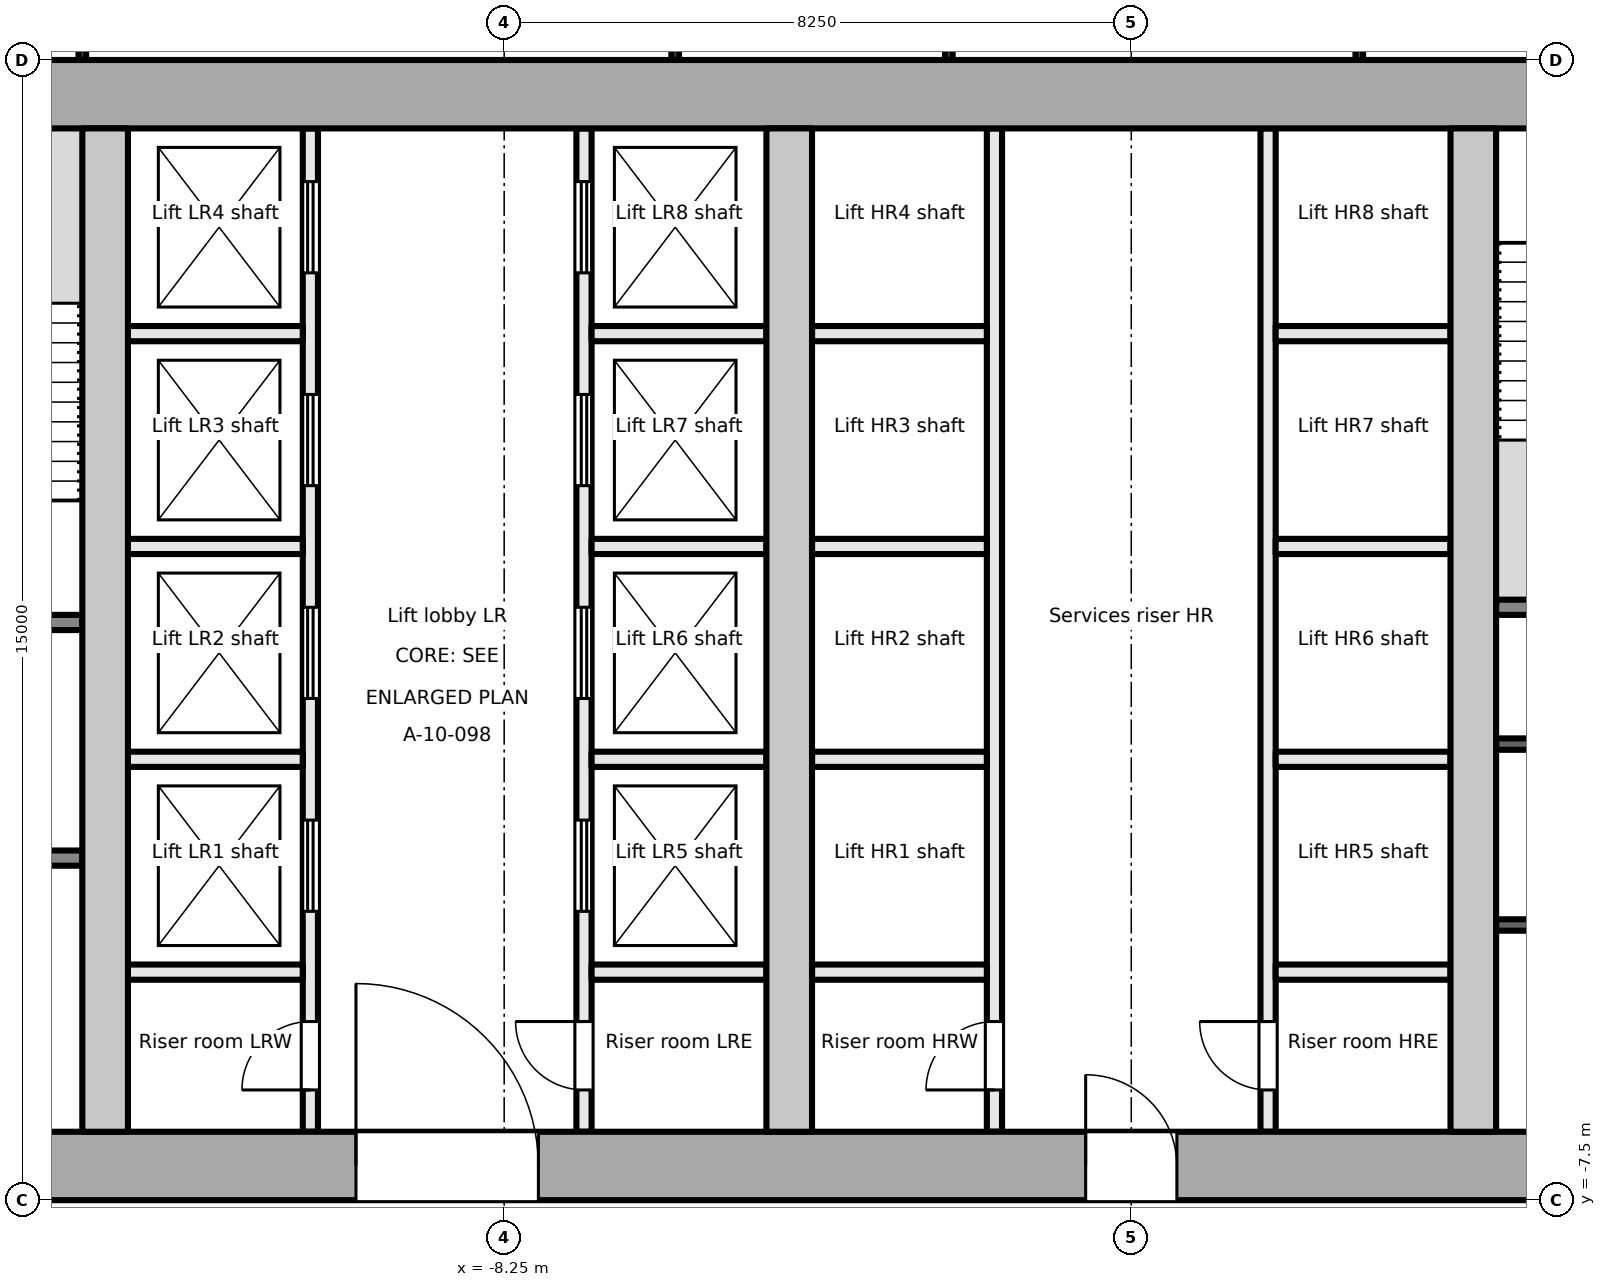
"""IFC4 building model, lengths in metres.
Left out: names, types, materials, properties, quantities, classifications, styles, units other than length and angle.
Written with IfcOpenShell. Run it as: python <this file> out.ifc"""

import sys

from ifc_helpers import new_model, si_unit, direction, frame, frame_2d, origin, place, context, subcontext, project, spatial, rectangle, extrude, element, fill, save


model = new_model("IFC4")
c1 = context("Model", 3, precision=1e-05, world=origin(), true_north=direction((0.0, 1.0)))
c2 = subcontext(c1, "Body", "Model", "MODEL_VIEW")
j1 = project(units=[si_unit("LENGTHUNIT", "METRE"), si_unit("PLANEANGLEUNIT", "RADIAN")], contexts=[c1])
p1 = place(None, origin())
s1 = spatial("IfcSite", under=j1, at=p1, CompositionType="ELEMENT")
p2 = place(p1, origin())
s2 = spatial("IfcBuilding", under=s1, at=p2, CompositionType="ELEMENT")
p3 = place(p2, frame((0.0, 0.0, 142.1)))
s3 = spatial("IfcBuildingStorey", under=s2, at=p3, CompositionType="ELEMENT", Elevation=142.1)
p4 = place(p3, frame((-18.0, -7.05, -0.2), z_axis=(0.0, 0.0, 1.0), x_axis=(1.0, 0.0, 0.0)))
e1 = element("IfcWall", 1, at=p4, inside=s3, PredefinedType="SHEAR", context=c2, shape_type="SweptSolid", body=[
    extrude(rectangle(XDim=36.0, YDim=0.9, at=frame_2d((18.0, 0.0))), origin(), (0.0, 0.0, 1.0), 4.0),
])
p5 = place(p4, frame((7.8, 0.0, 0.2)))
e2 = element("IfcOpeningElement", 2, at=p5, cuts=e1, PredefinedType="OPENING", context=c2, shape_type="SweptSolid", body=[
    extrude(rectangle(XDim=2.4, YDim=2.1, at=frame_2d((1.2, 1.05))), frame((0.0, 0.46, 0.0), z_axis=(0.0, -1.0, 0.0), x_axis=(1.0, 0.0, 0.0)), (0.0, 0.0, 1.0), 0.921),
])
p6 = place(p4, frame((17.4, 0.0, 0.2)))
e3 = element("IfcOpeningElement", 3, at=p6, cuts=e1, PredefinedType="OPENING", context=c2, shape_type="SweptSolid", body=[
    extrude(rectangle(XDim=1.2, YDim=2.1, at=frame_2d((0.6, 1.05))), frame((0.0, 0.46, 0.0), z_axis=(0.0, -1.0, 0.0), x_axis=(1.0, 0.0, 0.0)), (0.0, 0.0, 1.0), 0.921),
])
p7 = place(p4, frame((26.1, 0.0, 0.2)))
e4 = element("IfcOpeningElement", 4, at=p7, cuts=e1, PredefinedType="OPENING", context=c2, shape_type="SweptSolid", body=[
    extrude(rectangle(XDim=2.4, YDim=2.1, at=frame_2d((1.2, 1.05))), frame((0.0, 0.46, 0.0), z_axis=(0.0, -1.0, 0.0), x_axis=(1.0, 0.0, 0.0)), (0.0, 0.0, 1.0), 0.921),
])
p8 = place(p3, frame((-18.0, 7.05, -0.2), z_axis=(0.0, 0.0, 1.0), x_axis=(1.0, 0.0, 0.0)))
e5 = element("IfcWall", 5, at=p8, inside=s3, PredefinedType="SHEAR", context=c2, shape_type="SweptSolid", body=[
    extrude(rectangle(XDim=36.0, YDim=0.9, at=frame_2d((18.0, 0.0))), origin(), (0.0, 0.0, 1.0), 4.0),
])
for number, where, z_axis, x_axis in (
    (6, (-13.5, -6.6, -0.2), (0.0, 0.0, 1.0), (0.0, 1.0, 0.0)),
    (7, (-4.5, -6.6, -0.2), (0.0, 0.0, 1.0), (0.0, 1.0, 0.0)),
    (8, (4.5, -6.6, -0.2), (0.0, 0.0, 1.0), (0.0, 1.0, 0.0)),
):
    element("IfcWall", number, at=place(p3, frame(where, z_axis=z_axis, x_axis=x_axis)), inside=s3, PredefinedType="SHEAR", context=c2, shape_type="SweptSolid", body=[
        extrude(rectangle(XDim=13.2, YDim=0.6, at=frame_2d((6.6, 0.0))), origin(), (0.0, 0.0, 1.0), 4.0),
    ])
p9 = place(p3, frame((-17.1, -3.0, 0.0), z_axis=(0.0, 0.0, 1.0), x_axis=(1.0, 0.0, 0.0)))
e9 = element("IfcWall", 9, at=p9, inside=s3, PredefinedType="PARTITIONING", context=c2, shape_type="SweptSolid", body=[
    extrude(rectangle(XDim=3.3, YDim=0.2, at=frame_2d((1.65, 0.0))), origin(), (0.0, 0.0, 1.0), 3.8),
])
p10 = place(p9, frame((1.1, 0.0, 0.0)))
e10 = element("IfcOpeningElement", 10, at=p10, cuts=e9, PredefinedType="OPENING", context=c2, shape_type="SweptSolid", body=[
    extrude(rectangle(XDim=1.1, YDim=2.1, at=frame_2d((0.55, 1.05))), frame((0.0, 0.111, 0.0), z_axis=(0.0, -1.0, 0.0), x_axis=(1.0, 0.0, 0.0)), (0.0, 0.0, 1.0), 0.221),
])
p11 = place(p3, frame((-17.1, 0.1, 0.0), z_axis=(0.0, 0.0, 1.0), x_axis=(1.0, 0.0, 0.0)))
e11 = element("IfcWall", 11, at=p11, inside=s3, PredefinedType="PARTITIONING", context=c2, shape_type="SweptSolid", body=[
    extrude(rectangle(XDim=3.3, YDim=0.2, at=frame_2d((1.65, 0.0))), origin(), (0.0, 0.0, 1.0), 3.8),
])
p12 = place(p11, frame((1.1, 0.0, 0.0)))
e12 = element("IfcOpeningElement", 12, at=p12, cuts=e11, PredefinedType="OPENING", context=c2, shape_type="SweptSolid", body=[
    extrude(rectangle(XDim=1.1, YDim=2.1, at=frame_2d((0.55, 1.05))), frame((0.0, 0.111, 0.0), z_axis=(0.0, -1.0, 0.0), x_axis=(1.0, 0.0, 0.0)), (0.0, 0.0, 1.0), 0.221),
])
p13 = place(p3, frame((-10.8, -6.6, 0.0), z_axis=(0.0, 0.0, 1.0), x_axis=(0.0, 1.0, 0.0)))
e13 = element("IfcWall", 13, at=p13, inside=s3, PredefinedType="PARTITIONING", context=c2, shape_type="SweptSolid", body=[
    extrude(rectangle(XDim=13.2, YDim=0.2, at=frame_2d((6.6, 0.0))), origin(), (0.0, 0.0, 1.0), 3.8),
])
p14 = place(p13, frame((0.55, 0.0, 0.0)))
e14 = element("IfcOpeningElement", 14, at=p14, cuts=e13, PredefinedType="OPENING", context=c2, shape_type="SweptSolid", body=[
    extrude(rectangle(XDim=0.9, YDim=2.1, at=frame_2d((0.45, 1.05))), frame((0.0, 0.111, 0.0), z_axis=(0.0, -1.0, 0.0), x_axis=(1.0, 0.0, 0.0)), (0.0, 0.0, 1.0), 0.221),
])
p15 = place(p13, frame((2.9, 0.0, 0.0)))
e15 = element("IfcOpeningElement", 15, at=p15, cuts=e13, PredefinedType="OPENING", context=c2, shape_type="SweptSolid", body=[
    extrude(rectangle(XDim=1.2, YDim=2.1, at=frame_2d((0.6, 1.05))), frame((0.0, 0.111, 0.0), z_axis=(0.0, -1.0, 0.0), x_axis=(1.0, 0.0, 0.0)), (0.0, 0.0, 1.0), 0.221),
])
p16 = place(p13, frame((5.7, 0.0, 0.0)))
e16 = element("IfcOpeningElement", 16, at=p16, cuts=e13, PredefinedType="OPENING", context=c2, shape_type="SweptSolid", body=[
    extrude(rectangle(XDim=1.2, YDim=2.1, at=frame_2d((0.6, 1.05))), frame((0.0, 0.111, 0.0), z_axis=(0.0, -1.0, 0.0), x_axis=(1.0, 0.0, 0.0)), (0.0, 0.0, 1.0), 0.221),
])
p17 = place(p13, frame((8.5, 0.0, 0.0)))
e17 = element("IfcOpeningElement", 17, at=p17, cuts=e13, PredefinedType="OPENING", context=c2, shape_type="SweptSolid", body=[
    extrude(rectangle(XDim=1.2, YDim=2.1, at=frame_2d((0.6, 1.05))), frame((0.0, 0.111, 0.0), z_axis=(0.0, -1.0, 0.0), x_axis=(1.0, 0.0, 0.0)), (0.0, 0.0, 1.0), 0.221),
])
p18 = place(p13, frame((11.3, 0.0, 0.0)))
e18 = element("IfcOpeningElement", 18, at=p18, cuts=e13, PredefinedType="OPENING", context=c2, shape_type="SweptSolid", body=[
    extrude(rectangle(XDim=1.2, YDim=2.1, at=frame_2d((0.6, 1.05))), frame((0.0, 0.111, 0.0), z_axis=(0.0, -1.0, 0.0), x_axis=(1.0, 0.0, 0.0)), (0.0, 0.0, 1.0), 0.221),
])
p19 = place(p3, frame((-7.2, -6.6, 0.0), z_axis=(0.0, 0.0, 1.0), x_axis=(0.0, 1.0, 0.0)))
e19 = element("IfcWall", 19, at=p19, inside=s3, PredefinedType="PARTITIONING", context=c2, shape_type="SweptSolid", body=[
    extrude(rectangle(XDim=13.2, YDim=0.2, at=frame_2d((6.6, 0.0))), origin(), (0.0, 0.0, 1.0), 3.8),
])
p20 = place(p19, frame((0.55, 0.0, 0.0)))
e20 = element("IfcOpeningElement", 20, at=p20, cuts=e19, PredefinedType="OPENING", context=c2, shape_type="SweptSolid", body=[
    extrude(rectangle(XDim=0.9, YDim=2.1, at=frame_2d((0.45, 1.05))), frame((0.0, 0.111, 0.0), z_axis=(0.0, -1.0, 0.0), x_axis=(1.0, 0.0, 0.0)), (0.0, 0.0, 1.0), 0.221),
])
p21 = place(p19, frame((2.9, 0.0, 0.0)))
e21 = element("IfcOpeningElement", 21, at=p21, cuts=e19, PredefinedType="OPENING", context=c2, shape_type="SweptSolid", body=[
    extrude(rectangle(XDim=1.2, YDim=2.1, at=frame_2d((0.6, 1.05))), frame((0.0, 0.111, 0.0), z_axis=(0.0, -1.0, 0.0), x_axis=(1.0, 0.0, 0.0)), (0.0, 0.0, 1.0), 0.221),
])
p22 = place(p19, frame((5.7, 0.0, 0.0)))
e22 = element("IfcOpeningElement", 22, at=p22, cuts=e19, PredefinedType="OPENING", context=c2, shape_type="SweptSolid", body=[
    extrude(rectangle(XDim=1.2, YDim=2.1, at=frame_2d((0.6, 1.05))), frame((0.0, 0.111, 0.0), z_axis=(0.0, -1.0, 0.0), x_axis=(1.0, 0.0, 0.0)), (0.0, 0.0, 1.0), 0.221),
])
p23 = place(p19, frame((8.5, 0.0, 0.0)))
e23 = element("IfcOpeningElement", 23, at=p23, cuts=e19, PredefinedType="OPENING", context=c2, shape_type="SweptSolid", body=[
    extrude(rectangle(XDim=1.2, YDim=2.1, at=frame_2d((0.6, 1.05))), frame((0.0, 0.111, 0.0), z_axis=(0.0, -1.0, 0.0), x_axis=(1.0, 0.0, 0.0)), (0.0, 0.0, 1.0), 0.221),
])
p24 = place(p19, frame((11.3, 0.0, 0.0)))
e24 = element("IfcOpeningElement", 24, at=p24, cuts=e19, PredefinedType="OPENING", context=c2, shape_type="SweptSolid", body=[
    extrude(rectangle(XDim=1.2, YDim=2.1, at=frame_2d((0.6, 1.05))), frame((0.0, 0.111, 0.0), z_axis=(0.0, -1.0, 0.0), x_axis=(1.0, 0.0, 0.0)), (0.0, 0.0, 1.0), 0.221),
])
for number, where, z_axis, x_axis in (
    (25, (-13.2, -1.7, 0.0), (0.0, 0.0, 1.0), (1.0, 0.0, 0.0)),
    (26, (-13.2, 1.1, 0.0), (0.0, 0.0, 1.0), (1.0, 0.0, 0.0)),
    (27, (-13.2, 3.9, 0.0), (0.0, 0.0, 1.0), (1.0, 0.0, 0.0)),
    (28, (-13.2, -4.5, 0.0), (0.0, 0.0, 1.0), (1.0, 0.0, 0.0)),
    (29, (-7.1, -1.7, 0.0), (0.0, 0.0, 1.0), (1.0, 0.0, 0.0)),
    (30, (-7.1, 1.1, 0.0), (0.0, 0.0, 1.0), (1.0, 0.0, 0.0)),
    (31, (-7.1, 3.9, 0.0), (0.0, 0.0, 1.0), (1.0, 0.0, 0.0)),
    (32, (-7.1, -4.5, 0.0), (0.0, 0.0, 1.0), (1.0, 0.0, 0.0)),
):
    element("IfcWall", number, at=place(p3, frame(where, z_axis=z_axis, x_axis=x_axis)), inside=s3, PredefinedType="PARTITIONING", context=c2, shape_type="SweptSolid", body=[
        extrude(rectangle(XDim=2.3, YDim=0.2, at=frame_2d((1.15, 0.0))), origin(), (0.0, 0.0, 1.0), 3.8),
    ])
p25 = place(p3, frame((-1.8, -6.6, 0.0), z_axis=(0.0, 0.0, 1.0), x_axis=(0.0, 1.0, 0.0)))
e33 = element("IfcWall", 33, at=p25, inside=s3, PredefinedType="PARTITIONING", context=c2, shape_type="SweptSolid", body=[
    extrude(rectangle(XDim=13.2, YDim=0.2, at=frame_2d((6.6, 0.0))), origin(), (0.0, 0.0, 1.0), 3.8),
])
p26 = place(p25, frame((0.55, 0.0, 0.0)))
e34 = element("IfcOpeningElement", 34, at=p26, cuts=e33, PredefinedType="OPENING", context=c2, shape_type="SweptSolid", body=[
    extrude(rectangle(XDim=0.9, YDim=2.1, at=frame_2d((0.45, 1.05))), frame((0.0, 0.111, 0.0), z_axis=(0.0, -1.0, 0.0), x_axis=(1.0, 0.0, 0.0)), (0.0, 0.0, 1.0), 0.221),
])
p27 = place(p3, frame((1.8, -6.6, 0.0), z_axis=(0.0, 0.0, 1.0), x_axis=(0.0, 1.0, 0.0)))
e35 = element("IfcWall", 35, at=p27, inside=s3, PredefinedType="PARTITIONING", context=c2, shape_type="SweptSolid", body=[
    extrude(rectangle(XDim=13.2, YDim=0.2, at=frame_2d((6.6, 0.0))), origin(), (0.0, 0.0, 1.0), 3.8),
])
p28 = place(p27, frame((0.55, 0.0, 0.0)))
e36 = element("IfcOpeningElement", 36, at=p28, cuts=e35, PredefinedType="OPENING", context=c2, shape_type="SweptSolid", body=[
    extrude(rectangle(XDim=0.9, YDim=2.1, at=frame_2d((0.45, 1.05))), frame((0.0, 0.111, 0.0), z_axis=(0.0, -1.0, 0.0), x_axis=(1.0, 0.0, 0.0)), (0.0, 0.0, 1.0), 0.221),
])
for number, where, z_axis, x_axis in (
    (37, (-4.2, -1.7, 0.0), (0.0, 0.0, 1.0), (1.0, 0.0, 0.0)),
    (38, (-4.2, 1.1, 0.0), (0.0, 0.0, 1.0), (1.0, 0.0, 0.0)),
    (39, (-4.2, 3.9, 0.0), (0.0, 0.0, 1.0), (1.0, 0.0, 0.0)),
    (40, (-4.2, -4.5, 0.0), (0.0, 0.0, 1.0), (1.0, 0.0, 0.0)),
    (41, (1.9, -1.7, 0.0), (0.0, 0.0, 1.0), (1.0, 0.0, 0.0)),
    (42, (1.9, 1.1, 0.0), (0.0, 0.0, 1.0), (1.0, 0.0, 0.0)),
    (43, (1.9, 3.9, 0.0), (0.0, 0.0, 1.0), (1.0, 0.0, 0.0)),
    (44, (1.9, -4.5, 0.0), (0.0, 0.0, 1.0), (1.0, 0.0, 0.0)),
):
    element("IfcWall", number, at=place(p3, frame(where, z_axis=z_axis, x_axis=x_axis)), inside=s3, PredefinedType="PARTITIONING", context=c2, shape_type="SweptSolid", body=[
        extrude(rectangle(XDim=2.3, YDim=0.2, at=frame_2d((1.15, 0.0))), origin(), (0.0, 0.0, 1.0), 3.8),
    ])
p29 = place(p3, frame((4.8, 0.3, 0.0), z_axis=(0.0, 0.0, 1.0), x_axis=(1.0, 0.0, 0.0)))
e45 = element("IfcWall", 45, at=p29, inside=s3, PredefinedType="PARTITIONING", context=c2, shape_type="SweptSolid", body=[
    extrude(rectangle(XDim=3.15, YDim=0.2, at=frame_2d((1.575, 0.0))), origin(), (0.0, 0.0, 1.0), 3.8),
])
for number, where, z_axis, x_axis in (
    (46, (4.8, -3.88, 0.0), (0.0, 0.0, 1.0), (1.0, 0.0, 0.0)),
    (47, (4.8, -1.5, 0.0), (0.0, 0.0, 1.0), (1.0, 0.0, 0.0)),
):
    element("IfcWall", number, at=place(p3, frame(where, z_axis=z_axis, x_axis=x_axis)), inside=s3, PredefinedType="PARTITIONING", context=c2, shape_type="SweptSolid", body=[
        extrude(rectangle(XDim=3.15, YDim=0.15, at=frame_2d((1.575, 0.0))), origin(), (0.0, 0.0, 1.0), 3.8),
    ])
p30 = place(p3, frame((3.0, 7.5, 0.0), z_axis=(0.0, 0.0, 1.0), x_axis=(0.0, 1.0, 0.0)))
e48 = element("IfcWall", 48, at=p30, inside=s3, PredefinedType="PARTITIONING", context=c2, shape_type="SweptSolid", body=[
    extrude(rectangle(XDim=2.95, YDim=0.1, at=frame_2d((1.475, 0.0))), origin(), (0.0, 0.0, 1.0), 3.8),
])
p31 = place(p30, frame((0.575, 0.0, 0.9)))
e49 = element("IfcOpeningElement", 49, at=p31, cuts=e48, PredefinedType="OPENING", context=c2, shape_type="SweptSolid", body=[
    extrude(rectangle(XDim=1.8, YDim=1.2, at=frame_2d((0.9, 0.6))), frame((0.0, 0.061, 0.0), z_axis=(0.0, -1.0, 0.0), x_axis=(1.0, 0.0, 0.0)), (0.0, 0.0, 1.0), 0.121),
])
for number, where, z_axis, x_axis in (
    (50, (-13.8, 10.45, 0.0), (0.0, 0.0, 1.0), (0.0, -1.0, 0.0)),
    (51, (-6.0, 10.45, 0.0), (0.0, 0.0, 1.0), (0.0, -1.0, 0.0)),
    (52, (-2.4, 10.45, 0.0), (0.0, 0.0, 1.0), (0.0, -1.0, 0.0)),
):
    element("IfcWall", number, at=place(p3, frame(where, z_axis=z_axis, x_axis=x_axis)), inside=s3, PredefinedType="PARTITIONING", context=c2, shape_type="SweptSolid", body=[
        extrude(rectangle(XDim=2.95, YDim=0.1, at=frame_2d((1.475, 0.0))), origin(), (0.0, 0.0, 1.0), 3.8),
    ])
p32 = place(p14, origin())
e53 = element("IfcDoor", 53, at=p32, inside=s3, OperationType="SINGLE_SWING_LEFT", PredefinedType="DOOR", context=c2, shape_type="SweptSolid", body=[
    extrude(rectangle(XDim=0.9, YDim=2.1, at=frame_2d((0.45, 1.05))), frame((0.0, 0.025, 0.0), z_axis=(0.0, -1.0, 0.0), x_axis=(1.0, 0.0, 0.0)), (0.0, 0.0, 1.0), 0.05),
])
fill(e14, e53)
p33 = place(p15, origin())
e54 = element("IfcDoor", 54, at=p33, inside=s3, OperationType="DOUBLE_DOOR_SLIDING", PredefinedType="DOOR", context=c2, shape_type="SweptSolid", body=[
    extrude(rectangle(XDim=1.2, YDim=2.1, at=frame_2d((0.6, 1.05))), frame((0.0, 0.025, 0.0), z_axis=(0.0, -1.0, 0.0), x_axis=(1.0, 0.0, 0.0)), (0.0, 0.0, 1.0), 0.05),
])
fill(e15, e54)
p34 = place(p16, origin())
e55 = element("IfcDoor", 55, at=p34, inside=s3, OperationType="DOUBLE_DOOR_SLIDING", PredefinedType="DOOR", context=c2, shape_type="SweptSolid", body=[
    extrude(rectangle(XDim=1.2, YDim=2.1, at=frame_2d((0.6, 1.05))), frame((0.0, 0.025, 0.0), z_axis=(0.0, -1.0, 0.0), x_axis=(1.0, 0.0, 0.0)), (0.0, 0.0, 1.0), 0.05),
])
fill(e16, e55)
p35 = place(p17, origin())
e56 = element("IfcDoor", 56, at=p35, inside=s3, OperationType="DOUBLE_DOOR_SLIDING", PredefinedType="DOOR", context=c2, shape_type="SweptSolid", body=[
    extrude(rectangle(XDim=1.2, YDim=2.1, at=frame_2d((0.6, 1.05))), frame((0.0, 0.025, 0.0), z_axis=(0.0, -1.0, 0.0), x_axis=(1.0, 0.0, 0.0)), (0.0, 0.0, 1.0), 0.05),
])
fill(e17, e56)
p36 = place(p18, origin())
e57 = element("IfcDoor", 57, at=p36, inside=s3, OperationType="DOUBLE_DOOR_SLIDING", PredefinedType="DOOR", context=c2, shape_type="SweptSolid", body=[
    extrude(rectangle(XDim=1.2, YDim=2.1, at=frame_2d((0.6, 1.05))), frame((0.0, 0.025, 0.0), z_axis=(0.0, -1.0, 0.0), x_axis=(1.0, 0.0, 0.0)), (0.0, 0.0, 1.0), 0.05),
])
fill(e18, e57)
p37 = place(p20, origin())
e58 = element("IfcDoor", 58, at=p37, inside=s3, OperationType="SINGLE_SWING_RIGHT", PredefinedType="DOOR", context=c2, shape_type="SweptSolid", body=[
    extrude(rectangle(XDim=0.9, YDim=2.1, at=frame_2d((0.45, 1.05))), frame((0.0, 0.025, 0.0), z_axis=(0.0, -1.0, 0.0), x_axis=(1.0, 0.0, 0.0)), (0.0, 0.0, 1.0), 0.05),
])
fill(e20, e58)
p38 = place(p21, origin())
e59 = element("IfcDoor", 59, at=p38, inside=s3, OperationType="DOUBLE_DOOR_SLIDING", PredefinedType="DOOR", context=c2, shape_type="SweptSolid", body=[
    extrude(rectangle(XDim=1.2, YDim=2.1, at=frame_2d((0.6, 1.05))), frame((0.0, 0.025, 0.0), z_axis=(0.0, -1.0, 0.0), x_axis=(1.0, 0.0, 0.0)), (0.0, 0.0, 1.0), 0.05),
])
fill(e21, e59)
p39 = place(p22, origin())
e60 = element("IfcDoor", 60, at=p39, inside=s3, OperationType="DOUBLE_DOOR_SLIDING", PredefinedType="DOOR", context=c2, shape_type="SweptSolid", body=[
    extrude(rectangle(XDim=1.2, YDim=2.1, at=frame_2d((0.6, 1.05))), frame((0.0, 0.025, 0.0), z_axis=(0.0, -1.0, 0.0), x_axis=(1.0, 0.0, 0.0)), (0.0, 0.0, 1.0), 0.05),
])
fill(e22, e60)
p40 = place(p23, origin())
e61 = element("IfcDoor", 61, at=p40, inside=s3, OperationType="DOUBLE_DOOR_SLIDING", PredefinedType="DOOR", context=c2, shape_type="SweptSolid", body=[
    extrude(rectangle(XDim=1.2, YDim=2.1, at=frame_2d((0.6, 1.05))), frame((0.0, 0.025, 0.0), z_axis=(0.0, -1.0, 0.0), x_axis=(1.0, 0.0, 0.0)), (0.0, 0.0, 1.0), 0.05),
])
fill(e23, e61)
p41 = place(p24, origin())
e62 = element("IfcDoor", 62, at=p41, inside=s3, OperationType="DOUBLE_DOOR_SLIDING", PredefinedType="DOOR", context=c2, shape_type="SweptSolid", body=[
    extrude(rectangle(XDim=1.2, YDim=2.1, at=frame_2d((0.6, 1.05))), frame((0.0, 0.025, 0.0), z_axis=(0.0, -1.0, 0.0), x_axis=(1.0, 0.0, 0.0)), (0.0, 0.0, 1.0), 0.05),
])
fill(e24, e62)
p42 = place(p5, origin())
e63 = element("IfcDoor", 63, at=p42, inside=s3, OperationType="DOUBLE_DOOR_DOUBLE_SWING", PredefinedType="DOOR", context=c2, shape_type="SweptSolid", body=[
    extrude(rectangle(XDim=2.4, YDim=2.1, at=frame_2d((1.2, 1.05))), frame((0.0, 0.025, 0.0), z_axis=(0.0, -1.0, 0.0), x_axis=(1.0, 0.0, 0.0)), (0.0, 0.0, 1.0), 0.05),
])
fill(e2, e63)
p43 = place(p26, origin())
e64 = element("IfcDoor", 64, at=p43, inside=s3, OperationType="SINGLE_SWING_LEFT", PredefinedType="DOOR", context=c2, shape_type="SweptSolid", body=[
    extrude(rectangle(XDim=0.9, YDim=2.1, at=frame_2d((0.45, 1.05))), frame((0.0, 0.025, 0.0), z_axis=(0.0, -1.0, 0.0), x_axis=(1.0, 0.0, 0.0)), (0.0, 0.0, 1.0), 0.05),
])
fill(e34, e64)
p44 = place(p28, origin())
e65 = element("IfcDoor", 65, at=p44, inside=s3, OperationType="SINGLE_SWING_RIGHT", PredefinedType="DOOR", context=c2, shape_type="SweptSolid", body=[
    extrude(rectangle(XDim=0.9, YDim=2.1, at=frame_2d((0.45, 1.05))), frame((0.0, 0.025, 0.0), z_axis=(0.0, -1.0, 0.0), x_axis=(1.0, 0.0, 0.0)), (0.0, 0.0, 1.0), 0.05),
])
fill(e36, e65)
p45 = place(p6, origin())
e66 = element("IfcDoor", 66, at=p45, inside=s3, OperationType="SINGLE_SWING_LEFT", PredefinedType="DOOR", context=c2, shape_type="SweptSolid", body=[
    extrude(rectangle(XDim=1.2, YDim=2.1, at=frame_2d((0.6, 1.05))), frame((0.0, 0.025, 0.0), z_axis=(0.0, -1.0, 0.0), x_axis=(1.0, 0.0, 0.0)), (0.0, 0.0, 1.0), 0.05),
])
fill(e3, e66)
save(model, sys.argv[1])
